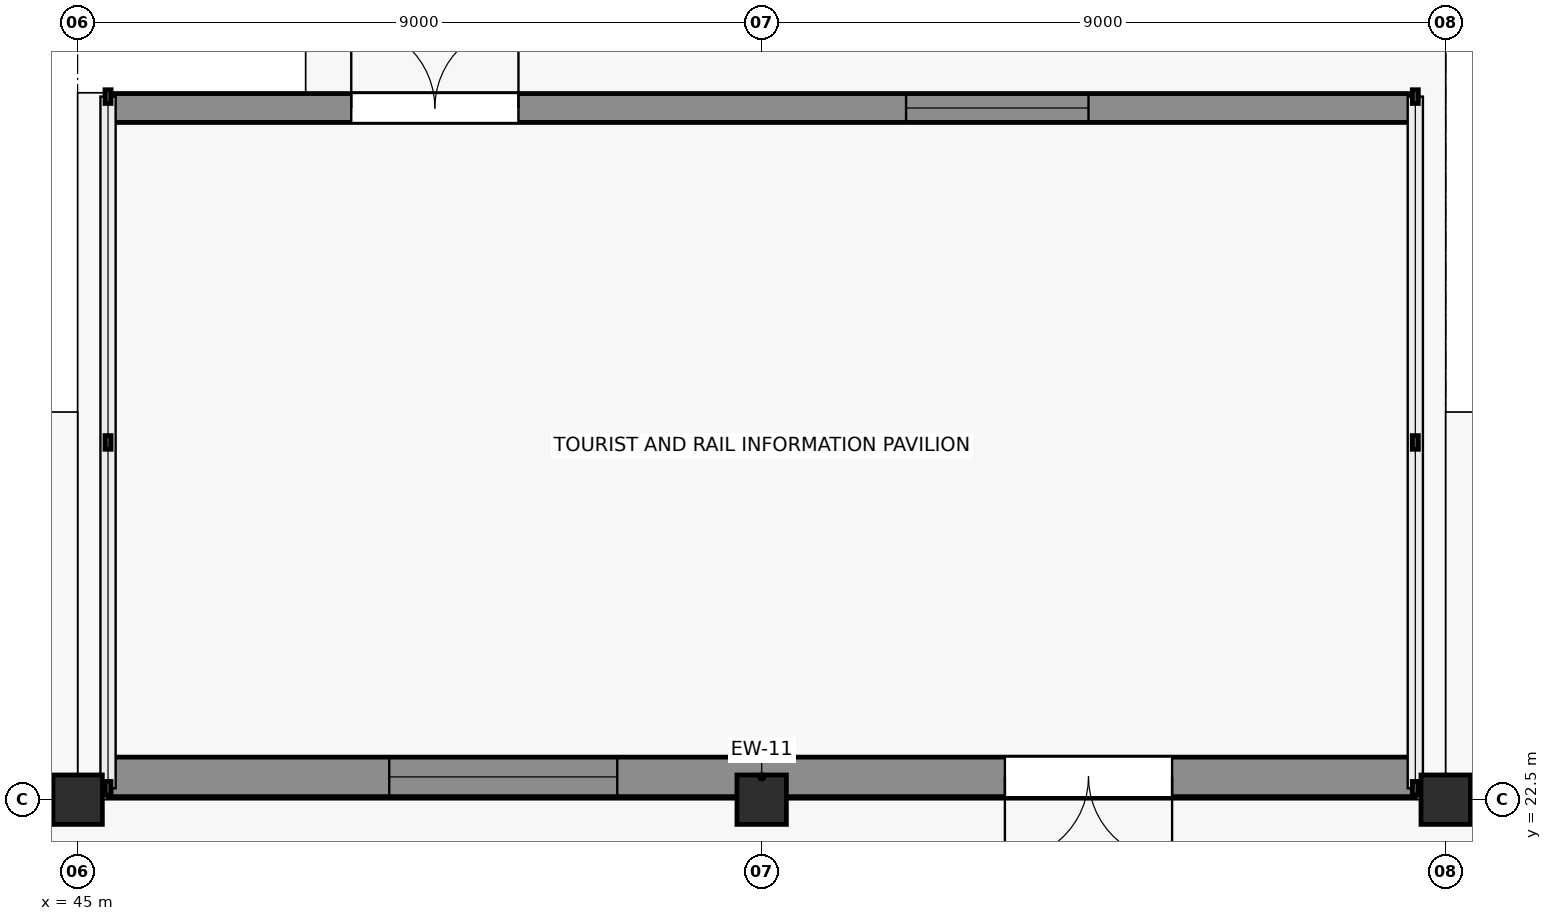
"""IFC4 building model, lengths in metres.
Left out: names, types, materials, properties, quantities, classifications, styles, units other than length and angle.
Written with IfcOpenShell. Run it as: python <this file> out.ifc"""

import sys

from ifc_helpers import new_model, si_unit, direction, frame, frame_2d, origin, origin_2d, place, context, subcontext, project, spatial, rectangle, extrude, element, fill, save


model = new_model("IFC4")
c1 = context("Model", 3, precision=1e-05, world=origin(), true_north=direction((0.0, 1.0)))
c2 = subcontext(c1, "Body", "Model", "MODEL_VIEW")
j1 = project(units=[si_unit("LENGTHUNIT", "METRE"), si_unit("PLANEANGLEUNIT", "RADIAN")], contexts=[c1])
p1 = place(None, origin())
s1 = spatial("IfcSite", under=j1, at=p1, CompositionType="ELEMENT")
p2 = place(p1, origin())
s2 = spatial("IfcBuilding", under=s1, at=p2, CompositionType="ELEMENT")
p3 = place(p2, origin())
s3 = spatial("IfcBuildingStorey", under=s2, at=p3, CompositionType="ELEMENT", Elevation=0.0)
for number, where, z_axis, x_axis in (
    (1, (45.0, 22.5, 0.0), (0.0, 0.0, 1.0), (1.0, 0.0, 0.0)),
    (2, (54.0, 22.5, 0.0), (0.0, 0.0, 1.0), (1.0, 0.0, 0.0)),
    (3, (63.0, 22.5, 0.0), (0.0, 0.0, 1.0), (1.0, 0.0, 0.0)),
):
    element("IfcColumn", number, at=place(p3, frame(where, z_axis=z_axis, x_axis=x_axis)), inside=s3, PredefinedType="COLUMN", context=c2, shape_type="SweptSolid", body=[
        extrude(rectangle(XDim=0.65, YDim=0.65, at=origin_2d()), origin(), (0.0, 0.0, 1.0), 6.64),
    ])
p4 = place(p3, frame((62.6, 22.8, 0.0), z_axis=(0.0, 0.0, 1.0), x_axis=(-1.0, 0.0, 0.0)))
e4 = element("IfcWall", 4, at=p4, inside=s3, PredefinedType="SOLIDWALL", context=c2, shape_type="SweptSolid", body=[
    extrude(rectangle(XDim=17.2, YDim=0.52, at=frame_2d((8.6, 0.0))), origin(), (0.0, 0.0, 1.0), 4.2),
])
p5 = place(p4, frame((3.2, 0.0, 0.0)))
e5 = element("IfcOpeningElement", 5, at=p5, cuts=e4, PredefinedType="OPENING", context=c2, shape_type="SweptSolid", body=[
    extrude(rectangle(XDim=2.2, YDim=2.4, at=frame_2d((1.1, 1.2))), frame((0.0, 0.27, 0.0), z_axis=(0.0, -1.0, 0.0), x_axis=(1.0, 0.0, 0.0)), (0.0, 0.0, 1.0), 0.54),
])
p6 = place(p4, frame((10.5, 0.0, 1.05)))
e6 = element("IfcOpeningElement", 6, at=p6, cuts=e4, PredefinedType="OPENING", context=c2, shape_type="SweptSolid", body=[
    extrude(rectangle(XDim=3.0, YDim=1.6, at=frame_2d((1.5, 0.8))), frame((0.0, 0.27, 0.0), z_axis=(0.0, -1.0, 0.0), x_axis=(1.0, 0.0, 0.0)), (0.0, 0.0, 1.0), 0.54),
])
p7 = place(p3, frame((45.4, 31.6, 0.0), z_axis=(0.0, 0.0, 1.0), x_axis=(1.0, 0.0, 0.0)))
e7 = element("IfcWall", 7, at=p7, inside=s3, PredefinedType="SOLIDWALL", context=c2, shape_type="SweptSolid", body=[
    extrude(rectangle(XDim=17.2, YDim=0.38, at=frame_2d((8.6, 0.0))), origin(), (0.0, 0.0, 1.0), 4.2),
])
p8 = place(p7, frame((3.2, 0.0, 0.0)))
e8 = element("IfcOpeningElement", 8, at=p8, cuts=e7, PredefinedType="OPENING", context=c2, shape_type="SweptSolid", body=[
    extrude(rectangle(XDim=2.2, YDim=2.4, at=frame_2d((1.1, 1.2))), frame((0.0, 0.2, 0.0), z_axis=(0.0, -1.0, 0.0), x_axis=(1.0, 0.0, 0.0)), (0.0, 0.0, 1.0), 0.4),
])
p9 = place(p7, frame((10.5, 0.0, 1.05)))
e9 = element("IfcOpeningElement", 9, at=p9, cuts=e7, PredefinedType="OPENING", context=c2, shape_type="SweptSolid", body=[
    extrude(rectangle(XDim=2.4, YDim=1.6, at=frame_2d((1.2, 0.8))), frame((0.0, 0.2, 0.0), z_axis=(0.0, -1.0, 0.0), x_axis=(1.0, 0.0, 0.0)), (0.0, 0.0, 1.0), 0.4),
])
p10 = place(p5, origin())
e10 = element("IfcDoor", 10, at=p10, inside=s3, OperationType="DOUBLE_DOOR_SINGLE_SWING", PredefinedType="DOOR", context=c2, shape_type="SweptSolid", body=[
    extrude(rectangle(XDim=2.2, YDim=2.4, at=frame_2d((1.1, 1.2))), frame((0.0, 0.025, 0.0), z_axis=(0.0, -1.0, 0.0), x_axis=(1.0, 0.0, 0.0)), (0.0, 0.0, 1.0), 0.05),
])
fill(e5, e10)
p11 = place(p6, origin())
e11 = element("IfcWindow", 11, at=p11, inside=s3, PartitioningType="SINGLE_PANEL", PredefinedType="WINDOW", context=c2, shape_type="SweptSolid", body=[
    extrude(rectangle(XDim=3.0, YDim=1.6, at=frame_2d((1.5, 0.8))), frame((0.0, 0.03, 0.0), z_axis=(0.0, -1.0, 0.0), x_axis=(1.0, 0.0, 0.0)), (0.0, 0.0, 1.0), 0.06),
])
fill(e6, e11)
p12 = place(p8, origin())
e12 = element("IfcDoor", 12, at=p12, inside=s3, OperationType="DOUBLE_DOOR_SINGLE_SWING", PredefinedType="DOOR", context=c2, shape_type="SweptSolid", body=[
    extrude(rectangle(XDim=2.2, YDim=2.4, at=frame_2d((1.1, 1.2))), frame((0.0, 0.025, 0.0), z_axis=(0.0, -1.0, 0.0), x_axis=(1.0, 0.0, 0.0)), (0.0, 0.0, 1.0), 0.05),
])
fill(e8, e12)
p13 = place(p9, origin())
e13 = element("IfcWindow", 13, at=p13, inside=s3, PartitioningType="SINGLE_PANEL", PredefinedType="WINDOW", context=c2, shape_type="SweptSolid", body=[
    extrude(rectangle(XDim=2.4, YDim=1.6, at=frame_2d((1.2, 0.8))), frame((0.0, 0.03, 0.0), z_axis=(0.0, -1.0, 0.0), x_axis=(1.0, 0.0, 0.0)), (0.0, 0.0, 1.0), 0.06),
])
fill(e9, e13)
save(model, sys.argv[1])
